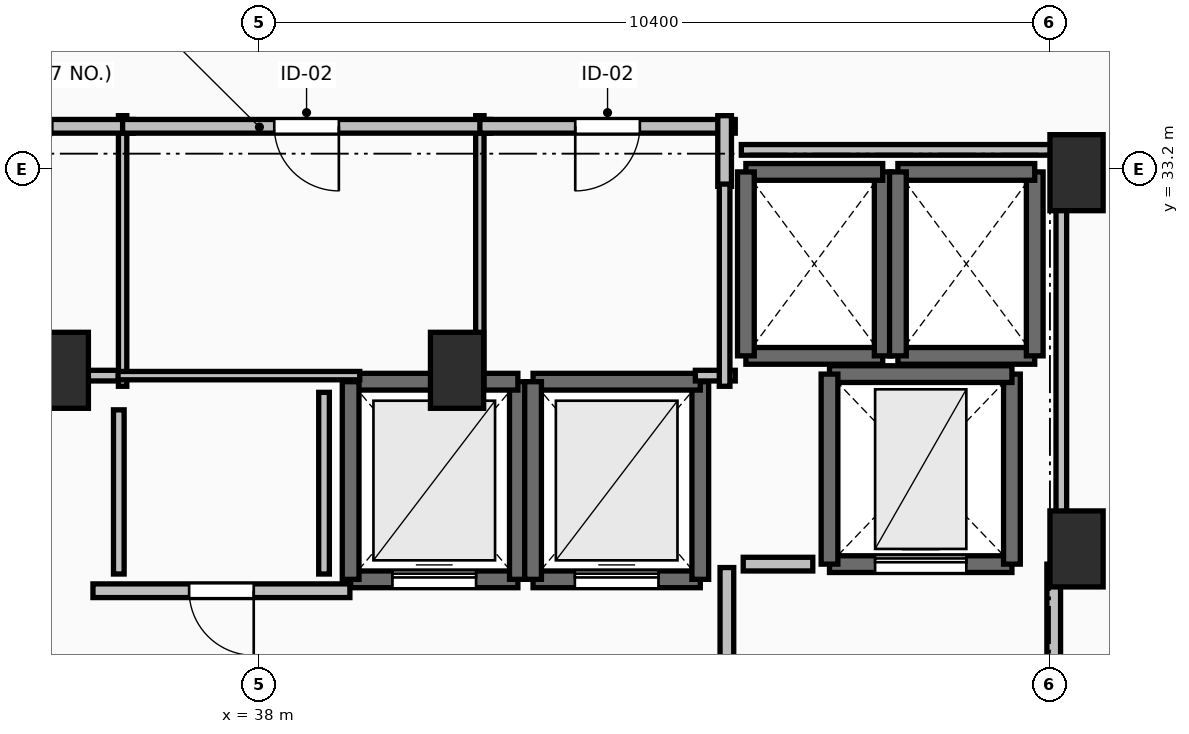
"""IFC4 building model, lengths in metres.
Left out: names, types, materials, properties, quantities, classifications, styles, units other than length and angle.
Written with IfcOpenShell. Run it as: python <this file> out.ifc"""

import sys

from ifc_helpers import new_model, si_unit, direction, frame, frame_2d, origin, origin_2d, place, context, subcontext, project, spatial, rectangle, extrude, element, fill, save


model = new_model("IFC4")
c1 = context("Model", 3, precision=1e-05, world=origin(), true_north=direction((0.0, 1.0)))
c2 = subcontext(c1, "Body", "Model", "MODEL_VIEW")
j1 = project(units=[si_unit("LENGTHUNIT", "METRE"), si_unit("PLANEANGLEUNIT", "RADIAN")], contexts=[c1])
p1 = place(None, origin())
s1 = spatial("IfcSite", under=j1, at=p1, CompositionType="ELEMENT")
p2 = place(p1, origin())
s2 = spatial("IfcBuilding", under=s1, at=p2, CompositionType="ELEMENT")
p3 = place(p2, frame((0.0, 0.0, 234.25)))
s3 = spatial("IfcBuildingStorey", under=s2, at=p3, CompositionType="ELEMENT", Elevation=234.25)
for number, where, z_axis, x_axis in (
    (1, (48.75, 33.15, 0.0), (0.0, 0.0, 1.0), (1.0, 0.0, 0.0)),
    (2, (48.75, 28.2, 0.0), (0.0, 0.0, 1.0), (1.0, 0.0, 0.0)),
    (3, (35.4, 30.55, 0.0), (0.0, 0.0, 1.0), (1.0, 0.0, 0.0)),
    (4, (40.6, 30.55, 0.0), (0.0, 0.0, 1.0), (1.0, 0.0, 0.0)),
):
    element("IfcColumn", number, at=place(p3, frame(where, z_axis=z_axis, x_axis=x_axis)), inside=s3, PredefinedType="PILASTER", context=c2, shape_type="SweptSolid", body=[
        extrude(rectangle(XDim=0.7, YDim=1.0, at=origin_2d()), origin(), (0.0, 0.0, 1.0), 3.55),
    ])
p4 = place(p3, frame((39.2, 27.8, 0.0), z_axis=(0.0, 0.0, 1.0), x_axis=(1.0, 0.0, 0.0)))
e5 = element("IfcWall", 5, at=p4, inside=s3, PredefinedType="SOLIDWALL", context=c2, shape_type="SweptSolid", body=[
    extrude(rectangle(XDim=2.2, YDim=0.22, at=frame_2d((1.1, 0.0))), origin(), (0.0, 0.0, 1.0), 3.29),
])
p5 = place(p4, frame((0.55, 0.0, 0.0)))
e6 = element("IfcOpeningElement", 6, at=p5, cuts=e5, PredefinedType="OPENING", context=c2, shape_type="SweptSolid", body=[
    extrude(rectangle(XDim=1.1, YDim=2.2, at=frame_2d((0.55, 1.1))), frame((0.0, 0.125, 0.0), z_axis=(0.0, -1.0, 0.0), x_axis=(1.0, 0.0, 0.0)), (0.0, 0.0, 1.0), 0.25),
])
p6 = place(p3, frame((41.4, 27.8, 0.0), z_axis=(0.0, 0.0, 1.0), x_axis=(0.0, 1.0, 0.0)))
e7 = element("IfcWall", 7, at=p6, inside=s3, PredefinedType="SOLIDWALL", context=c2, shape_type="SweptSolid", body=[
    extrude(rectangle(XDim=2.6, YDim=0.22, at=frame_2d((1.3, 0.0))), origin(), (0.0, 0.0, 1.0), 3.29),
])
p7 = place(p3, frame((41.4, 30.4, 0.0), z_axis=(0.0, 0.0, 1.0), x_axis=(-1.0, 0.0, 0.0)))
e8 = element("IfcWall", 8, at=p7, inside=s3, PredefinedType="SOLIDWALL", context=c2, shape_type="SweptSolid", body=[
    extrude(rectangle(XDim=2.2, YDim=0.22, at=frame_2d((1.1, 0.0))), origin(), (0.0, 0.0, 1.0), 3.29),
])
p8 = place(p3, frame((39.2, 30.4, 0.0), z_axis=(0.0, 0.0, 1.0), x_axis=(0.0, -1.0, 0.0)))
e9 = element("IfcWall", 9, at=p8, inside=s3, PredefinedType="SOLIDWALL", context=c2, shape_type="SweptSolid", body=[
    extrude(rectangle(XDim=2.6, YDim=0.22, at=frame_2d((1.3, 0.0))), origin(), (0.0, 0.0, 1.0), 3.29),
])
p9 = place(p3, frame((41.6, 27.8, 0.0), z_axis=(0.0, 0.0, 1.0), x_axis=(1.0, 0.0, 0.0)))
e10 = element("IfcWall", 10, at=p9, inside=s3, PredefinedType="SOLIDWALL", context=c2, shape_type="SweptSolid", body=[
    extrude(rectangle(XDim=2.2, YDim=0.22, at=frame_2d((1.1, 0.0))), origin(), (0.0, 0.0, 1.0), 3.29),
])
p10 = place(p9, frame((0.55, 0.0, 0.0)))
e11 = element("IfcOpeningElement", 11, at=p10, cuts=e10, PredefinedType="OPENING", context=c2, shape_type="SweptSolid", body=[
    extrude(rectangle(XDim=1.1, YDim=2.2, at=frame_2d((0.55, 1.1))), frame((0.0, 0.125, 0.0), z_axis=(0.0, -1.0, 0.0), x_axis=(1.0, 0.0, 0.0)), (0.0, 0.0, 1.0), 0.25),
])
p11 = place(p3, frame((43.8, 27.8, 0.0), z_axis=(0.0, 0.0, 1.0), x_axis=(0.0, 1.0, 0.0)))
e12 = element("IfcWall", 12, at=p11, inside=s3, PredefinedType="SOLIDWALL", context=c2, shape_type="SweptSolid", body=[
    extrude(rectangle(XDim=2.6, YDim=0.22, at=frame_2d((1.3, 0.0))), origin(), (0.0, 0.0, 1.0), 3.29),
])
p12 = place(p3, frame((43.8, 30.4, 0.0), z_axis=(0.0, 0.0, 1.0), x_axis=(-1.0, 0.0, 0.0)))
e13 = element("IfcWall", 13, at=p12, inside=s3, PredefinedType="SOLIDWALL", context=c2, shape_type="SweptSolid", body=[
    extrude(rectangle(XDim=2.2, YDim=0.22, at=frame_2d((1.1, 0.0))), origin(), (0.0, 0.0, 1.0), 3.29),
])
p13 = place(p3, frame((41.6, 30.4, 0.0), z_axis=(0.0, 0.0, 1.0), x_axis=(0.0, -1.0, 0.0)))
e14 = element("IfcWall", 14, at=p13, inside=s3, PredefinedType="SOLIDWALL", context=c2, shape_type="SweptSolid", body=[
    extrude(rectangle(XDim=2.6, YDim=0.22, at=frame_2d((1.3, 0.0))), origin(), (0.0, 0.0, 1.0), 3.29),
])
p14 = place(p3, frame((44.4, 30.74, 0.0), z_axis=(0.0, 0.0, 1.0), x_axis=(1.0, 0.0, 0.0)))
e15 = element("IfcWall", 15, at=p14, inside=s3, PredefinedType="SOLIDWALL", context=c2, shape_type="SweptSolid", body=[
    extrude(rectangle(XDim=1.8, YDim=0.22, at=frame_2d((0.9, 0.0))), origin(), (0.0, 0.0, 1.0), 3.29),
])
p15 = place(p3, frame((46.2, 30.74, 0.0), z_axis=(0.0, 0.0, 1.0), x_axis=(0.0, 1.0, 0.0)))
e16 = element("IfcWall", 16, at=p15, inside=s3, PredefinedType="SOLIDWALL", context=c2, shape_type="SweptSolid", body=[
    extrude(rectangle(XDim=2.42, YDim=0.22, at=frame_2d((1.21, 0.0))), origin(), (0.0, 0.0, 1.0), 3.29),
])
p16 = place(p3, frame((46.2, 33.16, 0.0), z_axis=(0.0, 0.0, 1.0), x_axis=(-1.0, 0.0, 0.0)))
e17 = element("IfcWall", 17, at=p16, inside=s3, PredefinedType="SOLIDWALL", context=c2, shape_type="SweptSolid", body=[
    extrude(rectangle(XDim=1.8, YDim=0.22, at=frame_2d((0.9, 0.0))), origin(), (0.0, 0.0, 1.0), 3.29),
])
p17 = place(p3, frame((44.4, 33.16, 0.0), z_axis=(0.0, 0.0, 1.0), x_axis=(0.0, -1.0, 0.0)))
e18 = element("IfcWall", 18, at=p17, inside=s3, PredefinedType="SOLIDWALL", context=c2, shape_type="SweptSolid", body=[
    extrude(rectangle(XDim=2.42, YDim=0.22, at=frame_2d((1.21, 0.0))), origin(), (0.0, 0.0, 1.0), 3.29),
])
p18 = place(p3, frame((46.4, 30.74, 0.0), z_axis=(0.0, 0.0, 1.0), x_axis=(1.0, 0.0, 0.0)))
e19 = element("IfcWall", 19, at=p18, inside=s3, PredefinedType="SOLIDWALL", context=c2, shape_type="SweptSolid", body=[
    extrude(rectangle(XDim=1.8, YDim=0.22, at=frame_2d((0.9, 0.0))), origin(), (0.0, 0.0, 1.0), 3.29),
])
p19 = place(p3, frame((48.2, 30.74, 0.0), z_axis=(0.0, 0.0, 1.0), x_axis=(0.0, 1.0, 0.0)))
e20 = element("IfcWall", 20, at=p19, inside=s3, PredefinedType="SOLIDWALL", context=c2, shape_type="SweptSolid", body=[
    extrude(rectangle(XDim=2.42, YDim=0.22, at=frame_2d((1.21, 0.0))), origin(), (0.0, 0.0, 1.0), 3.29),
])
p20 = place(p3, frame((48.2, 33.16, 0.0), z_axis=(0.0, 0.0, 1.0), x_axis=(-1.0, 0.0, 0.0)))
e21 = element("IfcWall", 21, at=p20, inside=s3, PredefinedType="SOLIDWALL", context=c2, shape_type="SweptSolid", body=[
    extrude(rectangle(XDim=1.8, YDim=0.22, at=frame_2d((0.9, 0.0))), origin(), (0.0, 0.0, 1.0), 3.29),
])
p21 = place(p3, frame((46.4, 33.16, 0.0), z_axis=(0.0, 0.0, 1.0), x_axis=(0.0, -1.0, 0.0)))
e22 = element("IfcWall", 22, at=p21, inside=s3, PredefinedType="SOLIDWALL", context=c2, shape_type="SweptSolid", body=[
    extrude(rectangle(XDim=2.42, YDim=0.22, at=frame_2d((1.21, 0.0))), origin(), (0.0, 0.0, 1.0), 3.29),
])
p22 = place(p3, frame((45.5, 28.0, 0.0), z_axis=(0.0, 0.0, 1.0), x_axis=(1.0, 0.0, 0.0)))
e23 = element("IfcWall", 23, at=p22, inside=s3, PredefinedType="SHEAR", context=c2, shape_type="SweptSolid", body=[
    extrude(rectangle(XDim=2.4, YDim=0.22, at=frame_2d((1.2, 0.0))), origin(), (0.0, 0.0, 1.0), 3.29),
])
p23 = place(p22, frame((0.6, 0.0, 0.0)))
e24 = element("IfcOpeningElement", 24, at=p23, cuts=e23, PredefinedType="OPENING", context=c2, shape_type="SweptSolid", body=[
    extrude(rectangle(XDim=1.2, YDim=2.2, at=frame_2d((0.6, 1.1))), frame((0.0, 0.125, 0.0), z_axis=(0.0, -1.0, 0.0), x_axis=(1.0, 0.0, 0.0)), (0.0, 0.0, 1.0), 0.25),
])
p24 = place(p3, frame((47.9, 28.0, 0.0), z_axis=(0.0, 0.0, 1.0), x_axis=(0.0, 1.0, 0.0)))
e25 = element("IfcWall", 25, at=p24, inside=s3, PredefinedType="SHEAR", context=c2, shape_type="SweptSolid", body=[
    extrude(rectangle(XDim=2.5, YDim=0.22, at=frame_2d((1.25, 0.0))), origin(), (0.0, 0.0, 1.0), 3.29),
])
p25 = place(p3, frame((47.9, 30.5, 0.0), z_axis=(0.0, 0.0, 1.0), x_axis=(-1.0, 0.0, 0.0)))
e26 = element("IfcWall", 26, at=p25, inside=s3, PredefinedType="SHEAR", context=c2, shape_type="SweptSolid", body=[
    extrude(rectangle(XDim=2.4, YDim=0.22, at=frame_2d((1.2, 0.0))), origin(), (0.0, 0.0, 1.0), 3.29),
])
p26 = place(p3, frame((45.5, 30.5, 0.0), z_axis=(0.0, 0.0, 1.0), x_axis=(0.0, -1.0, 0.0)))
e27 = element("IfcWall", 27, at=p26, inside=s3, PredefinedType="SHEAR", context=c2, shape_type="SweptSolid", body=[
    extrude(rectangle(XDim=2.5, YDim=0.22, at=frame_2d((1.25, 0.0))), origin(), (0.0, 0.0, 1.0), 3.29),
])
p27 = place(p3, frame((44.15, 27.955, 0.0), z_axis=(0.0, 0.0, 1.0), x_axis=(0.0, -1.0, 0.0)))
e28 = element("IfcWall", 28, at=p27, inside=s3, PredefinedType="PARTITIONING", context=c2, shape_type="SweptSolid", body=[
    extrude(rectangle(XDim=3.91, YDim=0.18, at=frame_2d((1.955, 0.0))), origin(), (0.0, 0.0, 1.0), 3.29),
])
p28 = place(p27, frame((1.355, 0.0, 0.0)))
e29 = element("IfcOpeningElement", 29, at=p28, cuts=e28, PredefinedType="OPENING", context=c2, shape_type="SweptSolid", body=[
    extrude(rectangle(XDim=1.2, YDim=2.15, at=frame_2d((0.6, 1.075))), frame((0.0, 0.105, 0.0), z_axis=(0.0, -1.0, 0.0), x_axis=(1.0, 0.0, 0.0)), (0.0, 0.0, 1.0), 0.21),
])
p29 = place(p3, frame((48.45, 23.95, 0.0), z_axis=(0.0, 0.0, 1.0), x_axis=(0.0, 1.0, 0.0)))
e30 = element("IfcWall", 30, at=p29, inside=s3, PredefinedType="PARTITIONING", context=c2, shape_type="SweptSolid", body=[
    extrude(rectangle(XDim=4.05, YDim=0.18, at=frame_2d((2.025, 0.0))), origin(), (0.0, 0.0, 1.0), 3.29),
])
p30 = place(p29, frame((1.425, 0.0, 0.0)))
e31 = element("IfcOpeningElement", 31, at=p30, cuts=e30, PredefinedType="OPENING", context=c2, shape_type="SweptSolid", body=[
    extrude(rectangle(XDim=1.2, YDim=2.15, at=frame_2d((0.6, 1.075))), frame((0.0, 0.105, 0.0), z_axis=(0.0, -1.0, 0.0), x_axis=(1.0, 0.0, 0.0)), (0.0, 0.0, 1.0), 0.21),
])
p31 = place(p3, frame((39.19, 27.65, 0.0), z_axis=(0.0, 0.0, 1.0), x_axis=(-1.0, 0.0, 0.0)))
e32 = element("IfcWall", 32, at=p31, inside=s3, PredefinedType="PARTITIONING", context=c2, shape_type="SweptSolid", body=[
    extrude(rectangle(XDim=3.38, YDim=0.18, at=frame_2d((1.69, 0.0))), origin(), (0.0, 0.0, 1.0), 3.29),
])
p32 = place(p31, frame((1.265, 0.0, 0.0)))
e33 = element("IfcOpeningElement", 33, at=p32, cuts=e32, PredefinedType="OPENING", context=c2, shape_type="SweptSolid", body=[
    extrude(rectangle(XDim=0.85, YDim=2.1, at=frame_2d((0.425, 1.05))), frame((0.0, 0.105, 0.0), z_axis=(0.0, -1.0, 0.0), x_axis=(1.0, 0.0, 0.0)), (0.0, 0.0, 1.0), 0.21),
])
p33 = place(p3, frame((36.2, 30.34, 0.0), z_axis=(0.0, 0.0, 1.0), x_axis=(0.0, 1.0, 0.0)))
e34 = element("IfcWall", 34, at=p33, inside=s3, PredefinedType="PARTITIONING", context=c2, shape_type="SweptSolid", body=[
    extrude(rectangle(XDim=3.56, YDim=0.11, at=frame_2d((1.78, 0.0))), origin(), (0.0, 0.0, 1.0), 2.482),
])
p34 = place(p3, frame((36.34, 33.76, 0.0), z_axis=(0.0, 0.0, 1.0), x_axis=(-1.0, 0.0, 0.0)))
e35 = element("IfcWall", 35, at=p34, inside=s3, PredefinedType="PARTITIONING", context=c2, shape_type="SweptSolid", body=[
    extrude(rectangle(XDim=2.98, YDim=0.18, at=frame_2d((1.49, 0.0))), origin(), (0.0, 0.0, 1.0), 3.29),
])
p35 = place(p34, frame((1.065, 0.0, 0.0)))
e36 = element("IfcOpeningElement", 36, at=p35, cuts=e35, PredefinedType="OPENING", context=c2, shape_type="SweptSolid", body=[
    extrude(rectangle(XDim=0.85, YDim=2.1, at=frame_2d((0.425, 1.05))), frame((0.0, 0.105, 0.0), z_axis=(0.0, -1.0, 0.0), x_axis=(1.0, 0.0, 0.0)), (0.0, 0.0, 1.0), 0.21),
])
p36 = place(p3, frame((40.9, 30.34, 0.0), z_axis=(0.0, 0.0, 1.0), x_axis=(0.0, 1.0, 0.0)))
e37 = element("IfcWall", 37, at=p36, inside=s3, PredefinedType="PARTITIONING", context=c2, shape_type="SweptSolid", body=[
    extrude(rectangle(XDim=3.56, YDim=0.11, at=frame_2d((1.78, 0.0))), origin(), (0.0, 0.0, 1.0), 3.29),
])
p37 = place(p3, frame((36.11, 30.48, 0.0), z_axis=(0.0, 0.0, 1.0), x_axis=(1.0, 0.0, 0.0)))
e38 = element("IfcWall", 38, at=p37, inside=s3, PredefinedType="PARTITIONING", context=c2, shape_type="SweptSolid", body=[
    extrude(rectangle(XDim=3.21, YDim=0.11, at=frame_2d((1.605, 0.0))), origin(), (0.0, 0.0, 1.0), 2.482),
])
p38 = place(p3, frame((41.04, 33.76, 0.0), z_axis=(0.0, 0.0, 1.0), x_axis=(-1.0, 0.0, 0.0)))
e39 = element("IfcWall", 39, at=p38, inside=s3, PredefinedType="PARTITIONING", context=c2, shape_type="SweptSolid", body=[
    extrude(rectangle(XDim=4.84, YDim=0.18, at=frame_2d((2.42, 0.0))), origin(), (0.0, 0.0, 1.0), 3.29),
])
p39 = place(p38, frame((1.995, 0.0, 0.0)))
e40 = element("IfcOpeningElement", 40, at=p39, cuts=e39, PredefinedType="OPENING", context=c2, shape_type="SweptSolid", body=[
    extrude(rectangle(XDim=0.85, YDim=2.1, at=frame_2d((0.425, 1.05))), frame((0.0, 0.105, 0.0), z_axis=(0.0, -1.0, 0.0), x_axis=(1.0, 0.0, 0.0)), (0.0, 0.0, 1.0), 0.21),
])
p40 = place(p3, frame((44.26, 33.76, 0.0), z_axis=(0.0, 0.0, 1.0), x_axis=(-1.0, 0.0, 0.0)))
e41 = element("IfcWall", 41, at=p40, inside=s3, PredefinedType="PARTITIONING", context=c2, shape_type="SweptSolid", body=[
    extrude(rectangle(XDim=3.36, YDim=0.18, at=frame_2d((1.68, 0.0))), origin(), (0.0, 0.0, 1.0), 3.29),
])
p41 = place(p40, frame((1.255, 0.0, 0.0)))
e42 = element("IfcOpeningElement", 42, at=p41, cuts=e41, PredefinedType="OPENING", context=c2, shape_type="SweptSolid", body=[
    extrude(rectangle(XDim=0.85, YDim=2.1, at=frame_2d((0.425, 1.05))), frame((0.0, 0.105, 0.0), z_axis=(0.0, -1.0, 0.0), x_axis=(1.0, 0.0, 0.0)), (0.0, 0.0, 1.0), 0.21),
])
p42 = place(p3, frame((44.12, 32.97, 0.0), z_axis=(0.0, 0.0, 1.0), x_axis=(0.0, 1.0, 0.0)))
e43 = element("IfcWall", 43, at=p42, inside=s3, PredefinedType="PARTITIONING", context=c2, shape_type="SweptSolid", body=[
    extrude(rectangle(XDim=0.93, YDim=0.18, at=frame_2d((0.465, 0.0))), origin(), (0.0, 0.0, 1.0), 3.29),
])
p43 = place(p3, frame((45.28, 28.0, 0.0), z_axis=(0.0, 0.0, 1.0), x_axis=(-1.0, 0.0, 0.0)))
e44 = element("IfcWall", 44, at=p43, inside=s3, PredefinedType="PARTITIONING", context=c2, shape_type="SweptSolid", body=[
    extrude(rectangle(XDim=0.915, YDim=0.18, at=frame_2d((0.458, 0.0))), origin(), (0.0, 0.0, 1.0), 3.29),
])
p44 = place(p3, frame((35.14, 30.48, 0.0), z_axis=(0.0, 0.0, 1.0), x_axis=(1.0, 0.0, 0.0)))
e45 = element("IfcWall", 45, at=p44, inside=s3, PredefinedType="PARTITIONING", context=c2, shape_type="SweptSolid", body=[
    extrude(rectangle(XDim=1.0, YDim=0.14, at=frame_2d((0.5, 0.0))), origin(), (0.0, 0.0, 1.0), 2.482),
])
p45 = place(p3, frame((43.735, 30.48, 0.0), z_axis=(0.0, 0.0, 1.0), x_axis=(1.0, 0.0, 0.0)))
e46 = element("IfcWall", 46, at=p45, inside=s3, PredefinedType="PARTITIONING", context=c2, shape_type="SweptSolid", body=[
    extrude(rectangle(XDim=0.525, YDim=0.14, at=frame_2d((0.262, 0.0))), origin(), (0.0, 0.0, 1.0), 3.29),
])
p46 = place(p3, frame((44.12, 30.34, 0.0), z_axis=(0.0, 0.0, 1.0), x_axis=(0.0, 1.0, 0.0)))
e47 = element("IfcWall", 47, at=p46, inside=s3, PredefinedType="PARTITIONING", context=c2, shape_type="SweptSolid", body=[
    extrude(rectangle(XDim=2.66, YDim=0.14, at=frame_2d((1.33, 0.0))), origin(), (0.0, 0.0, 1.0), 3.29),
])
p47 = place(p3, frame((36.15, 30.03, 0.0), z_axis=(0.0, 0.0, 1.0), x_axis=(0.0, -1.0, 0.0)))
e48 = element("IfcWall", 48, at=p47, inside=s3, PredefinedType="PARTITIONING", context=c2, shape_type="SweptSolid", body=[
    extrude(rectangle(XDim=2.16, YDim=0.14, at=frame_2d((1.08, 0.0))), origin(), (0.0, 0.0, 1.0), 3.29),
])
p48 = place(p3, frame((38.85, 27.87, 0.0), z_axis=(0.0, 0.0, 1.0), x_axis=(0.0, 1.0, 0.0)))
e49 = element("IfcWall", 49, at=p48, inside=s3, PredefinedType="PARTITIONING", context=c2, shape_type="SweptSolid", body=[
    extrude(rectangle(XDim=2.39, YDim=0.14, at=frame_2d((1.195, 0.0))), origin(), (0.0, 0.0, 1.0), 3.29),
])
p49 = place(p3, frame((48.55, 28.196, 0.0), z_axis=(0.0, 0.0, 1.0), x_axis=(0.0, 1.0, 0.0)))
e50 = element("IfcWall", 50, at=p49, inside=s3, PredefinedType="PARTITIONING", context=c2, shape_type="SweptSolid", body=[
    extrude(rectangle(XDim=5.254, YDim=0.14, at=frame_2d((2.627, 0.0))), origin(), (0.0, 0.0, 1.0), 2.482),
])
p50 = place(p3, frame((48.55, 33.45, 0.0), z_axis=(0.0, 0.0, 1.0), x_axis=(-1.0, 0.0, 0.0)))
e51 = element("IfcWall", 51, at=p50, inside=s3, PredefinedType="PARTITIONING", context=c2, shape_type="SweptSolid", body=[
    extrude(rectangle(XDim=4.21, YDim=0.14, at=frame_2d((2.105, 0.0))), origin(), (0.0, 0.0, 1.0), 2.482),
])
p51 = place(p5, origin())
e52 = element("IfcDoor", 52, at=p51, inside=s3, OperationType="SLIDING_TO_LEFT", PredefinedType="DOOR", context=c2, shape_type="SweptSolid", body=[
    extrude(rectangle(XDim=1.1, YDim=2.2, at=frame_2d((0.55, 1.1))), frame((0.0, 0.025, 0.0), z_axis=(0.0, -1.0, 0.0), x_axis=(1.0, 0.0, 0.0)), (0.0, 0.0, 1.0), 0.05),
])
fill(e6, e52)
p52 = place(p10, origin())
e53 = element("IfcDoor", 53, at=p52, inside=s3, OperationType="SLIDING_TO_LEFT", PredefinedType="DOOR", context=c2, shape_type="SweptSolid", body=[
    extrude(rectangle(XDim=1.1, YDim=2.2, at=frame_2d((0.55, 1.1))), frame((0.0, 0.025, 0.0), z_axis=(0.0, -1.0, 0.0), x_axis=(1.0, 0.0, 0.0)), (0.0, 0.0, 1.0), 0.05),
])
fill(e11, e53)
p53 = place(p23, origin())
e54 = element("IfcDoor", 54, at=p53, inside=s3, OperationType="SLIDING_TO_LEFT", PredefinedType="DOOR", context=c2, shape_type="SweptSolid", body=[
    extrude(rectangle(XDim=1.2, YDim=2.2, at=frame_2d((0.6, 1.1))), frame((0.0, 0.025, 0.0), z_axis=(0.0, -1.0, 0.0), x_axis=(1.0, 0.0, 0.0)), (0.0, 0.0, 1.0), 0.05),
])
fill(e24, e54)
p54 = place(p32, origin())
e55 = element("IfcDoor", 55, at=p54, inside=s3, OperationType="SINGLE_SWING_LEFT", PredefinedType="DOOR", context=c2, shape_type="SweptSolid", body=[
    extrude(rectangle(XDim=0.85, YDim=2.1, at=frame_2d((0.425, 1.05))), frame((0.0, 0.025, 0.0), z_axis=(0.0, -1.0, 0.0), x_axis=(1.0, 0.0, 0.0)), (0.0, 0.0, 1.0), 0.05),
])
fill(e33, e55)
p55 = place(p35, origin())
e56 = element("IfcDoor", 56, at=p55, inside=s3, OperationType="SINGLE_SWING_RIGHT", PredefinedType="DOOR", context=c2, shape_type="SweptSolid", body=[
    extrude(rectangle(XDim=0.85, YDim=2.1, at=frame_2d((0.425, 1.05))), frame((0.0, 0.025, 0.0), z_axis=(0.0, -1.0, 0.0), x_axis=(1.0, 0.0, 0.0)), (0.0, 0.0, 1.0), 0.05),
])
fill(e36, e56)
p56 = place(p39, origin())
e57 = element("IfcDoor", 57, at=p56, inside=s3, OperationType="SINGLE_SWING_LEFT", PredefinedType="DOOR", context=c2, shape_type="SweptSolid", body=[
    extrude(rectangle(XDim=0.85, YDim=2.1, at=frame_2d((0.425, 1.05))), frame((0.0, 0.025, 0.0), z_axis=(0.0, -1.0, 0.0), x_axis=(1.0, 0.0, 0.0)), (0.0, 0.0, 1.0), 0.05),
])
fill(e40, e57)
p57 = place(p41, origin())
e58 = element("IfcDoor", 58, at=p57, inside=s3, OperationType="SINGLE_SWING_RIGHT", PredefinedType="DOOR", context=c2, shape_type="SweptSolid", body=[
    extrude(rectangle(XDim=0.85, YDim=2.1, at=frame_2d((0.425, 1.05))), frame((0.0, 0.025, 0.0), z_axis=(0.0, -1.0, 0.0), x_axis=(1.0, 0.0, 0.0)), (0.0, 0.0, 1.0), 0.05),
])
fill(e42, e58)
save(model, sys.argv[1])
